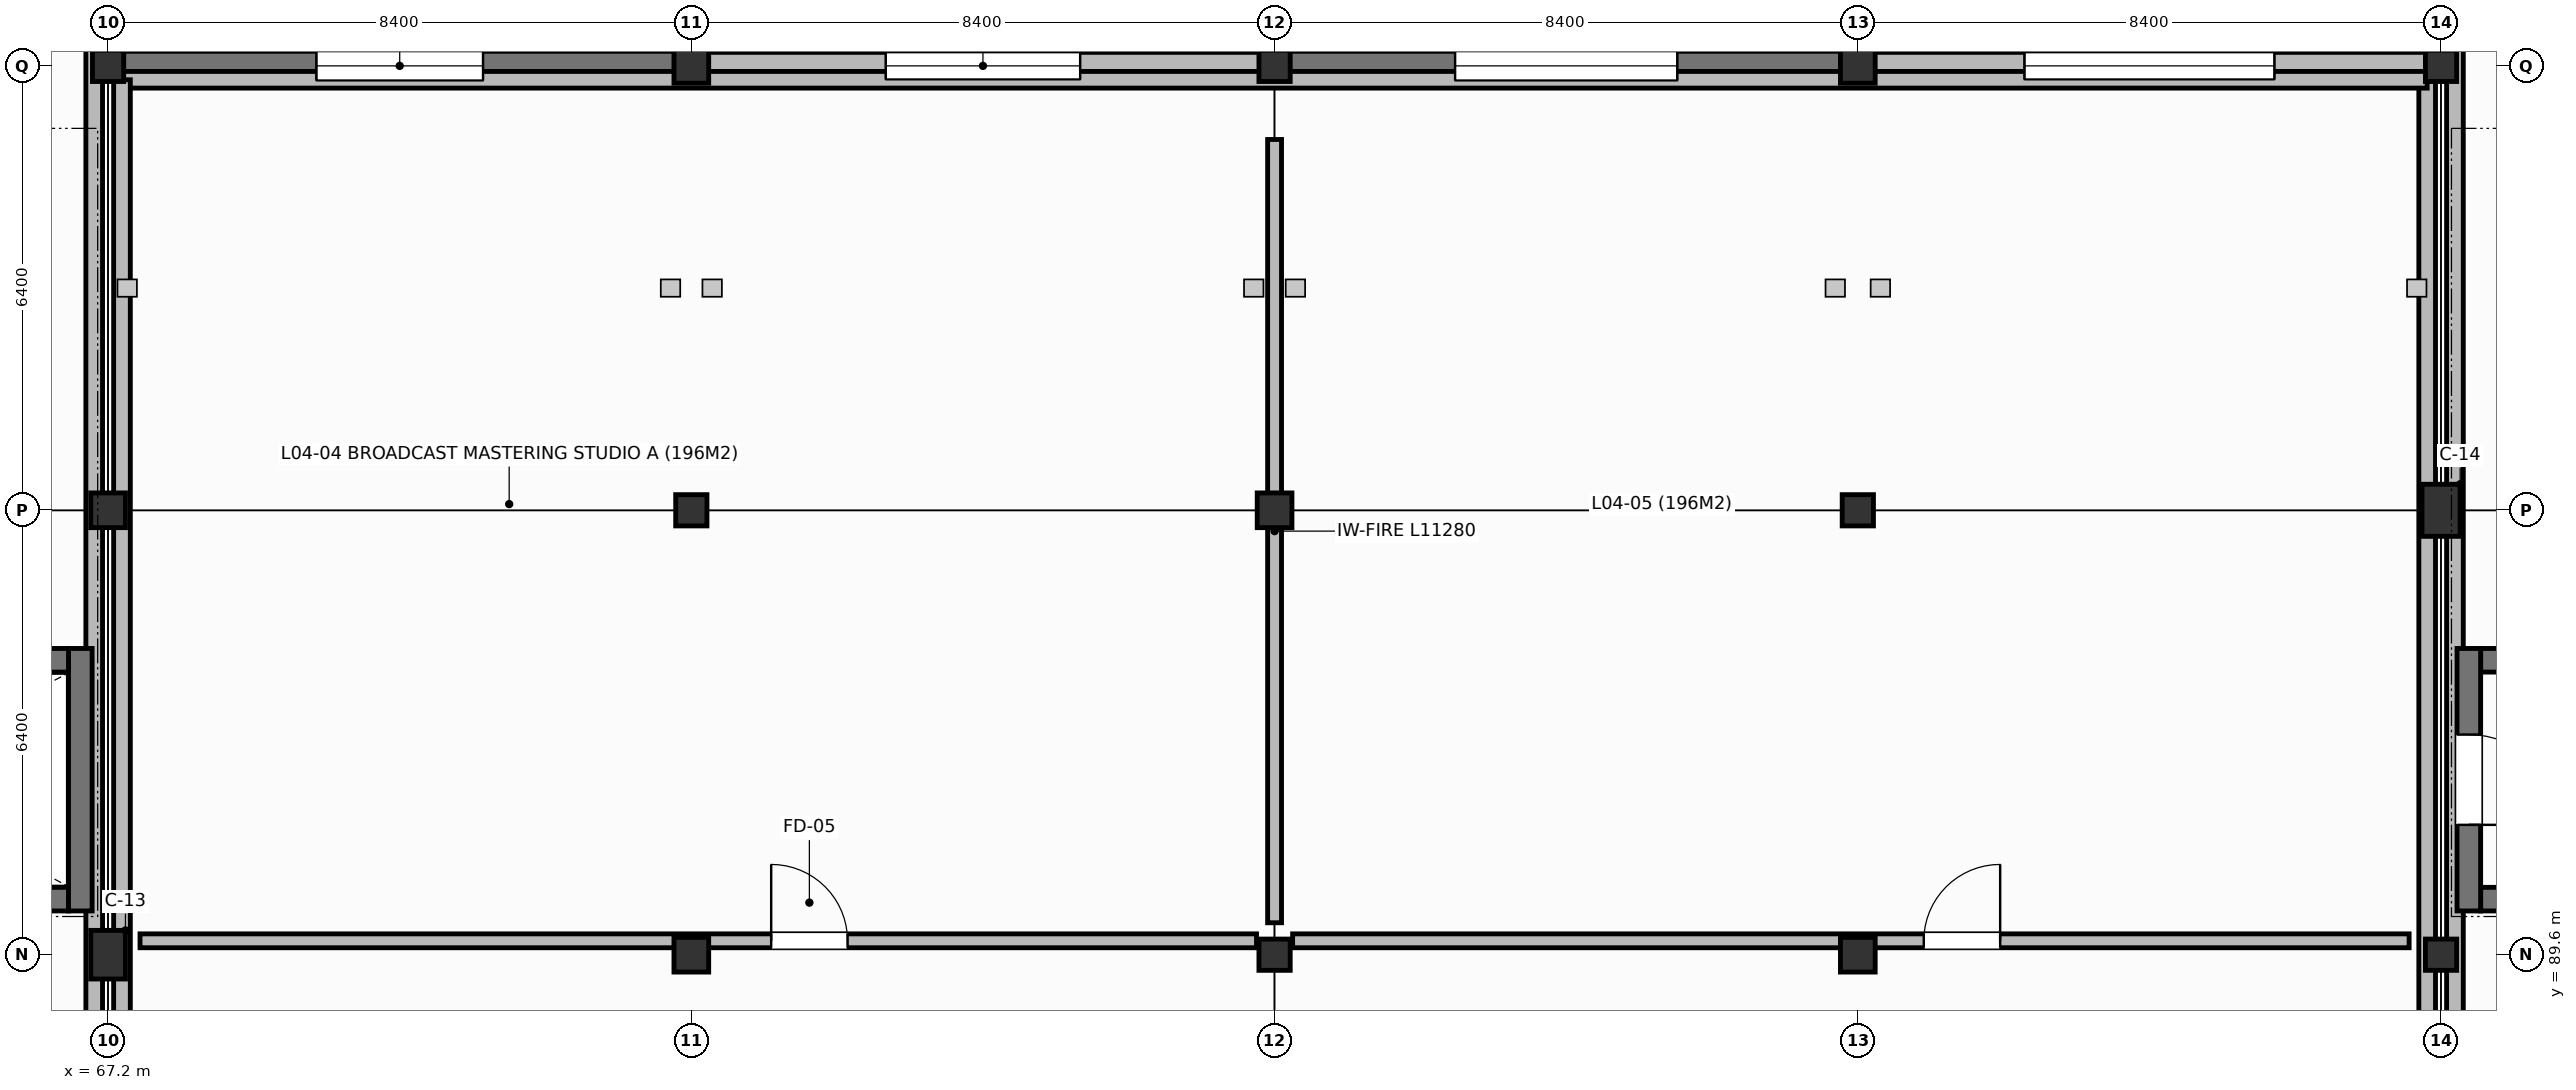
"""IFC4 building model, lengths in metres.
Left out: names, types, materials, properties, quantities, classifications, styles, units other than length and angle.
Written with IfcOpenShell. Run it as: python <this file> out.ifc"""

import sys

from ifc_helpers import new_model, si_unit, direction, frame, frame_2d, origin, origin_2d, place, context, subcontext, project, spatial, rectangle, extrude, element, fill, save


model = new_model("IFC4")
c1 = context("Model", 3, precision=1e-05, world=origin(), true_north=direction((0.0, 1.0)))
c2 = subcontext(c1, "Body", "Model", "MODEL_VIEW")
j1 = project(units=[si_unit("LENGTHUNIT", "METRE"), si_unit("PLANEANGLEUNIT", "RADIAN")], contexts=[c1])
p1 = place(None, origin())
s1 = spatial("IfcSite", under=j1, at=p1, CompositionType="ELEMENT")
p2 = place(p1, origin())
s2 = spatial("IfcBuilding", under=s1, at=p2, CompositionType="ELEMENT")
p3 = place(p2, frame((0.0, 0.0, 17.4)))
s3 = spatial("IfcBuildingStorey", under=s2, at=p3, CompositionType="ELEMENT", Elevation=17.4)
p4 = place(p3, frame((67.2, 89.6, 0.0), z_axis=(0.0, 0.0, 1.0), x_axis=(1.0, 0.0, 0.0)))
e1 = element("IfcColumn", 1, at=p4, inside=s3, PredefinedType="COLUMN", context=c2, shape_type="SweptSolid", body=[
    extrude(rectangle(XDim=0.5, YDim=0.7, at=origin_2d()), origin(), (0.0, 0.0, 1.0), 4.2),
])
p5 = place(p3, frame((67.2, 96.0, 0.0), z_axis=(0.0, 0.0, 1.0), x_axis=(1.0, 0.0, 0.0)))
e2 = element("IfcColumn", 2, at=p5, inside=s3, PredefinedType="COLUMN", context=c2, shape_type="SweptSolid", body=[
    extrude(rectangle(XDim=0.5, YDim=0.5, at=origin_2d()), origin(), (0.0, 0.0, 1.0), 4.2),
])
p6 = place(p3, frame((67.2, 102.4, 0.0), z_axis=(0.0, 0.0, 1.0), x_axis=(1.0, 0.0, 0.0)))
e3 = element("IfcColumn", 3, at=p6, inside=s3, PredefinedType="COLUMN", context=c2, shape_type="SweptSolid", body=[
    extrude(rectangle(XDim=0.45, YDim=0.45, at=origin_2d()), origin(), (0.0, 0.0, 1.0), 4.2),
])
p7 = place(p3, frame((75.6, 89.6, 0.0), z_axis=(0.0, 0.0, 1.0), x_axis=(1.0, 0.0, 0.0)))
e4 = element("IfcColumn", 4, at=p7, inside=s3, PredefinedType="COLUMN", context=c2, shape_type="SweptSolid", body=[
    extrude(rectangle(XDim=0.5, YDim=0.5, at=origin_2d()), origin(), (0.0, 0.0, 1.0), 4.2),
])
p8 = place(p3, frame((75.6, 96.0, 0.0), z_axis=(0.0, 0.0, 1.0), x_axis=(1.0, 0.0, 0.0)))
e5 = element("IfcColumn", 5, at=p8, inside=s3, PredefinedType="COLUMN", context=c2, shape_type="SweptSolid", body=[
    extrude(rectangle(XDim=0.45, YDim=0.45, at=origin_2d()), origin(), (0.0, 0.0, 1.0), 4.2),
])
p9 = place(p3, frame((75.6, 102.4, 0.0), z_axis=(0.0, 0.0, 1.0), x_axis=(1.0, 0.0, 0.0)))
e6 = element("IfcColumn", 6, at=p9, inside=s3, PredefinedType="COLUMN", context=c2, shape_type="SweptSolid", body=[
    extrude(rectangle(XDim=0.5, YDim=0.5, at=origin_2d()), origin(), (0.0, 0.0, 1.0), 4.2),
])
p10 = place(p3, frame((84.0, 89.6, 0.0), z_axis=(0.0, 0.0, 1.0), x_axis=(1.0, 0.0, 0.0)))
e7 = element("IfcColumn", 7, at=p10, inside=s3, PredefinedType="COLUMN", context=c2, shape_type="SweptSolid", body=[
    extrude(rectangle(XDim=0.45, YDim=0.45, at=origin_2d()), origin(), (0.0, 0.0, 1.0), 4.2),
])
p11 = place(p3, frame((84.0, 96.0, 0.0), z_axis=(0.0, 0.0, 1.0), x_axis=(1.0, 0.0, 0.0)))
e8 = element("IfcColumn", 8, at=p11, inside=s3, PredefinedType="COLUMN", context=c2, shape_type="SweptSolid", body=[
    extrude(rectangle(XDim=0.5, YDim=0.5, at=origin_2d()), origin(), (0.0, 0.0, 1.0), 4.2),
])
p12 = place(p3, frame((84.0, 102.4, 0.0), z_axis=(0.0, 0.0, 1.0), x_axis=(1.0, 0.0, 0.0)))
e9 = element("IfcColumn", 9, at=p12, inside=s3, PredefinedType="COLUMN", context=c2, shape_type="SweptSolid", body=[
    extrude(rectangle(XDim=0.45, YDim=0.45, at=origin_2d()), origin(), (0.0, 0.0, 1.0), 4.2),
])
p13 = place(p3, frame((92.4, 89.6, 0.0), z_axis=(0.0, 0.0, 1.0), x_axis=(1.0, 0.0, 0.0)))
e10 = element("IfcColumn", 10, at=p13, inside=s3, PredefinedType="COLUMN", context=c2, shape_type="SweptSolid", body=[
    extrude(rectangle(XDim=0.5, YDim=0.5, at=origin_2d()), origin(), (0.0, 0.0, 1.0), 4.2),
])
p14 = place(p3, frame((92.4, 96.0, 0.0), z_axis=(0.0, 0.0, 1.0), x_axis=(1.0, 0.0, 0.0)))
e11 = element("IfcColumn", 11, at=p14, inside=s3, PredefinedType="COLUMN", context=c2, shape_type="SweptSolid", body=[
    extrude(rectangle(XDim=0.45, YDim=0.45, at=origin_2d()), origin(), (0.0, 0.0, 1.0), 4.2),
])
p15 = place(p3, frame((92.4, 102.4, 0.0), z_axis=(0.0, 0.0, 1.0), x_axis=(1.0, 0.0, 0.0)))
e12 = element("IfcColumn", 12, at=p15, inside=s3, PredefinedType="COLUMN", context=c2, shape_type="SweptSolid", body=[
    extrude(rectangle(XDim=0.5, YDim=0.5, at=origin_2d()), origin(), (0.0, 0.0, 1.0), 4.2),
])
p16 = place(p3, frame((100.8, 89.6, 0.0), z_axis=(0.0, 0.0, 1.0), x_axis=(1.0, 0.0, 0.0)))
e13 = element("IfcColumn", 13, at=p16, inside=s3, PredefinedType="COLUMN", context=c2, shape_type="SweptSolid", body=[
    extrude(rectangle(XDim=0.45, YDim=0.45, at=origin_2d()), origin(), (0.0, 0.0, 1.0), 4.2),
])
p17 = place(p3, frame((100.8, 96.0, 0.0), z_axis=(0.0, 0.0, 1.0), x_axis=(1.0, 0.0, 0.0)))
e14 = element("IfcColumn", 14, at=p17, inside=s3, PredefinedType="COLUMN", context=c2, shape_type="SweptSolid", body=[
    extrude(rectangle(XDim=0.55, YDim=0.75, at=origin_2d()), origin(), (0.0, 0.0, 1.0), 4.2),
])
p18 = place(p3, frame((100.8, 102.4, 0.0), z_axis=(0.0, 0.0, 1.0), x_axis=(1.0, 0.0, 0.0)))
e15 = element("IfcColumn", 15, at=p18, inside=s3, PredefinedType="COLUMN", context=c2, shape_type="SweptSolid", body=[
    extrude(rectangle(XDim=0.45, YDim=0.45, at=origin_2d()), origin(), (0.0, 0.0, 1.0), 4.2),
])
p19 = place(p3, frame((67.2, 108.8, 0.0), z_axis=(0.0, 0.0, 1.0), x_axis=(0.0, -1.0, 0.0)))
e16 = element("IfcWall", 16, at=p19, inside=s3, PredefinedType="STANDARD", context=c2, shape_type="SweptSolid", body=[
    extrude(rectangle(XDim=6.4, YDim=0.39, at=frame_2d((3.2, 0.0))), origin(), (0.0, 0.0, 1.0), 2.89),
])
p20 = place(p19, frame((2.15, 0.0, 0.8)))
e17 = element("IfcOpeningElement", 17, at=p20, cuts=e16, PredefinedType="OPENING", context=c2, shape_type="SweptSolid", body=[
    extrude(rectangle(XDim=2.1, YDim=1.45, at=frame_2d((1.05, 0.725))), frame((0.0, 0.205, 0.0), z_axis=(0.0, -1.0, 0.0), x_axis=(1.0, 0.0, 0.0)), (0.0, 0.0, 1.0), 0.41),
])
p21 = place(p3, frame((67.2, 102.4, 0.0), z_axis=(0.0, 0.0, 1.0), x_axis=(1.0, 0.0, 0.0)))
e18 = element("IfcWall", 18, at=p21, inside=s3, PredefinedType="STANDARD", context=c2, shape_type="SweptSolid", body=[
    extrude(rectangle(XDim=8.4, YDim=0.42, at=frame_2d((4.2, 0.0))), origin(), (0.0, 0.0, 1.0), 3.84),
])
p22 = place(p21, frame((3.0, 0.0, 0.8)))
e19 = element("IfcOpeningElement", 19, at=p22, cuts=e18, PredefinedType="OPENING", context=c2, shape_type="SweptSolid", body=[
    extrude(rectangle(XDim=2.4, YDim=1.45, at=frame_2d((1.2, 0.725))), frame((0.0, 0.22, 0.0), z_axis=(0.0, -1.0, 0.0), x_axis=(1.0, 0.0, 0.0)), (0.0, 0.0, 1.0), 0.44),
])
p23 = place(p3, frame((75.6, 102.4, 0.0), z_axis=(0.0, 0.0, 1.0), x_axis=(1.0, 0.0, 0.0)))
e20 = element("IfcWall", 20, at=p23, inside=s3, PredefinedType="STANDARD", context=c2, shape_type="SweptSolid", body=[
    extrude(rectangle(XDim=8.4, YDim=0.39, at=frame_2d((4.2, 0.0))), origin(), (0.0, 0.0, 1.0), 3.19),
])
p24 = place(p23, frame((2.8, 0.0, 0.8)))
e21 = element("IfcOpeningElement", 21, at=p24, cuts=e20, PredefinedType="OPENING", context=c2, shape_type="SweptSolid", body=[
    extrude(rectangle(XDim=2.8, YDim=1.6, at=frame_2d((1.4, 0.8))), frame((0.0, 0.205, 0.0), z_axis=(0.0, -1.0, 0.0), x_axis=(1.0, 0.0, 0.0)), (0.0, 0.0, 1.0), 0.41),
])
p25 = place(p3, frame((84.0, 102.4, 0.0), z_axis=(0.0, 0.0, 1.0), x_axis=(1.0, 0.0, 0.0)))
e22 = element("IfcWall", 22, at=p25, inside=s3, PredefinedType="STANDARD", context=c2, shape_type="SweptSolid", body=[
    extrude(rectangle(XDim=8.4, YDim=0.42, at=frame_2d((4.2, 0.0))), origin(), (0.0, 0.0, 1.0), 3.84),
])
p26 = place(p25, frame((2.6, 0.0, 0.8)))
e23 = element("IfcOpeningElement", 23, at=p26, cuts=e22, PredefinedType="OPENING", context=c2, shape_type="SweptSolid", body=[
    extrude(rectangle(XDim=3.2, YDim=1.6, at=frame_2d((1.6, 0.8))), frame((0.0, 0.22, 0.0), z_axis=(0.0, -1.0, 0.0), x_axis=(1.0, 0.0, 0.0)), (0.0, 0.0, 1.0), 0.44),
])
p27 = place(p3, frame((92.4, 102.4, 0.0), z_axis=(0.0, 0.0, 1.0), x_axis=(1.0, 0.0, 0.0)))
e24 = element("IfcWall", 24, at=p27, inside=s3, PredefinedType="STANDARD", context=c2, shape_type="SweptSolid", body=[
    extrude(rectangle(XDim=8.4, YDim=0.39, at=frame_2d((4.2, 0.0))), origin(), (0.0, 0.0, 1.0), 3.09),
])
p28 = place(p27, frame((2.4, 0.0, 0.8)))
e25 = element("IfcOpeningElement", 25, at=p28, cuts=e24, PredefinedType="OPENING", context=c2, shape_type="SweptSolid", body=[
    extrude(rectangle(XDim=3.6, YDim=1.6, at=frame_2d((1.8, 0.8))), frame((0.0, 0.205, 0.0), z_axis=(0.0, -1.0, 0.0), x_axis=(1.0, 0.0, 0.0)), (0.0, 0.0, 1.0), 0.41),
])
p29 = place(p3, frame((100.8, 102.4, 0.0), z_axis=(0.0, 0.0, 1.0), x_axis=(0.0, 1.0, 0.0)))
e26 = element("IfcWall", 26, at=p29, inside=s3, PredefinedType="STANDARD", context=c2, shape_type="SweptSolid", body=[
    extrude(rectangle(XDim=6.4, YDim=0.42, at=frame_2d((3.2, 0.0))), origin(), (0.0, 0.0, 1.0), 3.84),
])
p30 = place(p29, frame((2.6, 0.0, 0.8)))
e27 = element("IfcOpeningElement", 27, at=p30, cuts=e26, PredefinedType="OPENING", context=c2, shape_type="SweptSolid", body=[
    extrude(rectangle(XDim=1.2, YDim=1.65, at=frame_2d((0.6, 0.825))), frame((0.0, 0.22, 0.0), z_axis=(0.0, -1.0, 0.0), x_axis=(1.0, 0.0, 0.0)), (0.0, 0.0, 1.0), 0.44),
])
p31 = place(p3, frame((67.0, 83.4, 4.2), z_axis=(0.0, 0.0, 1.0), x_axis=(0.0, 1.0, 0.0)))
e28 = element("IfcWall", 28, at=p31, inside=s3, PredefinedType="PARAPET", context=c2, shape_type="SweptSolid", body=[
    extrude(rectangle(XDim=31.6, YDim=0.24, at=frame_2d((15.8, 0.0))), origin(), (0.0, 0.0, 1.0), 1.15),
])
p32 = place(p3, frame((100.6, 83.4, 4.2), z_axis=(0.0, 0.0, 1.0), x_axis=(0.0, 1.0, 0.0)))
e29 = element("IfcWall", 29, at=p32, inside=s3, PredefinedType="PARAPET", context=c2, shape_type="SweptSolid", body=[
    extrude(rectangle(XDim=18.8, YDim=0.24, at=frame_2d((9.4, 0.0))), origin(), (0.0, 0.0, 1.0), 1.15),
])
p33 = place(p3, frame((100.6, 102.2, 4.2), z_axis=(0.0, 0.0, 1.0), x_axis=(-1.0, 0.0, 0.0)))
e30 = element("IfcWall", 30, at=p33, inside=s3, PredefinedType="PARAPET", context=c2, shape_type="SweptSolid", body=[
    extrude(rectangle(XDim=33.2, YDim=0.24, at=frame_2d((16.6, 0.0))), origin(), (0.0, 0.0, 1.0), 1.15),
])
p34 = place(p3, frame((67.4, 102.2, 4.2), z_axis=(0.0, 0.0, 1.0), x_axis=(0.0, -1.0, 0.0)))
e31 = element("IfcWall", 31, at=p34, inside=s3, PredefinedType="PARAPET", context=c2, shape_type="SweptSolid", body=[
    extrude(rectangle(XDim=18.8, YDim=0.24, at=frame_2d((9.4, 0.0))), origin(), (0.0, 0.0, 1.0), 1.15),
])
p35 = place(p3, frame((101.0, 115.0, 4.2), z_axis=(0.0, 0.0, 1.0), x_axis=(0.0, -1.0, 0.0)))
e32 = element("IfcWall", 32, at=p35, inside=s3, PredefinedType="PARAPET", context=c2, shape_type="SweptSolid", body=[
    extrude(rectangle(XDim=31.6, YDim=0.24, at=frame_2d((15.8, 0.0))), origin(), (0.0, 0.0, 1.0), 1.15),
])
p36 = place(p3, frame((59.37, 90.4, 0.0), z_axis=(0.0, 0.0, 1.0), x_axis=(1.0, 0.0, 0.0)))
e33 = element("IfcWall", 33, at=p36, inside=s3, PredefinedType="SHEAR", context=c2, shape_type="SweptSolid", body=[
    extrude(rectangle(XDim=7.26, YDim=0.34, at=frame_2d((3.63, 0.0))), origin(), (0.0, 0.0, 1.0), 4.2),
])
p37 = place(p3, frame((66.8, 90.23, 0.0), z_axis=(0.0, 0.0, 1.0), x_axis=(0.0, 1.0, 0.0)))
e34 = element("IfcWall", 34, at=p37, inside=s3, PredefinedType="SHEAR", context=c2, shape_type="SweptSolid", body=[
    extrude(rectangle(XDim=3.78, YDim=0.34, at=frame_2d((1.89, 0.0))), origin(), (0.0, 0.0, 1.0), 4.2),
])
for number, where, z_axis, x_axis in (
    (35, (66.63, 93.84, 0.0), (0.0, 0.0, 1.0), (-1.0, 0.0, 0.0)),
    (36, (101.37, 90.4, 0.0), (0.0, 0.0, 1.0), (1.0, 0.0, 0.0)),
    (37, (108.63, 93.84, 0.0), (0.0, 0.0, 1.0), (-1.0, 0.0, 0.0)),
):
    element("IfcWall", number, at=place(p3, frame(where, z_axis=z_axis, x_axis=x_axis)), inside=s3, PredefinedType="SHEAR", context=c2, shape_type="SweptSolid", body=[
        extrude(rectangle(XDim=7.26, YDim=0.34, at=frame_2d((3.63, 0.0))), origin(), (0.0, 0.0, 1.0), 4.2),
    ])
p38 = place(p3, frame((101.2, 94.01, 0.0), z_axis=(0.0, 0.0, 1.0), x_axis=(0.0, -1.0, 0.0)))
e38 = element("IfcWall", 38, at=p38, inside=s3, PredefinedType="SHEAR", context=c2, shape_type="SweptSolid", body=[
    extrude(rectangle(XDim=3.78, YDim=0.34, at=frame_2d((1.89, 0.0))), origin(), (0.0, 0.0, 1.0), 4.2),
])
p39 = place(p38, frame((1.24, 0.0, 0.0)))
e39 = element("IfcOpeningElement", 39, at=p39, cuts=e38, PredefinedType="OPENING", context=c2, shape_type="SweptSolid", body=[
    extrude(rectangle(XDim=1.3, YDim=2.15, at=frame_2d((0.65, 1.075))), frame((0.0, 0.18, 0.0), z_axis=(0.0, -1.0, 0.0), x_axis=(1.0, 0.0, 0.0)), (0.0, 0.0, 1.0), 0.36),
])
p40 = place(p3, frame((67.66, 89.8, 0.0), z_axis=(0.0, 0.0, 1.0), x_axis=(1.0, 0.0, 0.0)))
e40 = element("IfcWall", 40, at=p40, inside=s3, PredefinedType="PARTITIONING", context=c2, shape_type="SweptSolid", body=[
    extrude(rectangle(XDim=16.08, YDim=0.2, at=frame_2d((8.04, 0.0))), origin(), (0.0, 0.0, 1.0), 2.915),
])
p41 = place(p40, frame((9.09, 0.0, 0.0)))
e41 = element("IfcOpeningElement", 41, at=p41, cuts=e40, PredefinedType="OPENING", context=c2, shape_type="SweptSolid", body=[
    extrude(rectangle(XDim=1.1, YDim=2.15, at=frame_2d((0.55, 1.075))), frame((0.0, 0.11, 0.0), z_axis=(0.0, -1.0, 0.0), x_axis=(1.0, 0.0, 0.0)), (0.0, 0.0, 1.0), 0.22),
])
p42 = place(p3, frame((84.0, 90.06, 0.0), z_axis=(0.0, 0.0, 1.0), x_axis=(0.0, 1.0, 0.0)))
e42 = element("IfcWall", 42, at=p42, inside=s3, PredefinedType="PARTITIONING", context=c2, shape_type="SweptSolid", body=[
    extrude(rectangle(XDim=11.28, YDim=0.2, at=frame_2d((5.64, 0.0))), origin(), (0.0, 0.0, 1.0), 2.765),
])
p43 = place(p3, frame((84.26, 89.8, 0.0), z_axis=(0.0, 0.0, 1.0), x_axis=(1.0, 0.0, 0.0)))
e43 = element("IfcWall", 43, at=p43, inside=s3, PredefinedType="PARTITIONING", context=c2, shape_type="SweptSolid", body=[
    extrude(rectangle(XDim=16.08, YDim=0.2, at=frame_2d((8.04, 0.0))), origin(), (0.0, 0.0, 1.0), 3.165),
])
p44 = place(p43, frame((9.09, 0.0, 0.0)))
e44 = element("IfcOpeningElement", 44, at=p44, cuts=e43, PredefinedType="OPENING", context=c2, shape_type="SweptSolid", body=[
    extrude(rectangle(XDim=1.1, YDim=2.15, at=frame_2d((0.55, 1.075))), frame((0.0, 0.11, 0.0), z_axis=(0.0, -1.0, 0.0), x_axis=(1.0, 0.0, 0.0)), (0.0, 0.0, 1.0), 0.22),
])
p45 = place(p22, origin())
e45 = element("IfcWindow", 45, at=p45, inside=s3, PartitioningType="TRIPLE_PANEL_VERTICAL", PredefinedType="WINDOW", context=c2, shape_type="SweptSolid", body=[
    extrude(rectangle(XDim=2.4, YDim=1.45, at=frame_2d((1.2, 0.725))), frame((0.0, 0.03, 0.0), z_axis=(0.0, -1.0, 0.0), x_axis=(1.0, 0.0, 0.0)), (0.0, 0.0, 1.0), 0.06),
])
fill(e19, e45)
p46 = place(p24, origin())
e46 = element("IfcWindow", 46, at=p46, inside=s3, PartitioningType="TRIPLE_PANEL_VERTICAL", PredefinedType="WINDOW", context=c2, shape_type="SweptSolid", body=[
    extrude(rectangle(XDim=2.8, YDim=1.6, at=frame_2d((1.4, 0.8))), frame((0.0, 0.03, 0.0), z_axis=(0.0, -1.0, 0.0), x_axis=(1.0, 0.0, 0.0)), (0.0, 0.0, 1.0), 0.06),
])
fill(e21, e46)
p47 = place(p26, origin())
e47 = element("IfcWindow", 47, at=p47, inside=s3, PartitioningType="TRIPLE_PANEL_VERTICAL", PredefinedType="WINDOW", context=c2, shape_type="SweptSolid", body=[
    extrude(rectangle(XDim=3.2, YDim=1.6, at=frame_2d((1.6, 0.8))), frame((0.0, 0.03, 0.0), z_axis=(0.0, -1.0, 0.0), x_axis=(1.0, 0.0, 0.0)), (0.0, 0.0, 1.0), 0.06),
])
fill(e23, e47)
p48 = place(p28, origin())
e48 = element("IfcWindow", 48, at=p48, inside=s3, PartitioningType="TRIPLE_PANEL_VERTICAL", PredefinedType="WINDOW", context=c2, shape_type="SweptSolid", body=[
    extrude(rectangle(XDim=3.6, YDim=1.6, at=frame_2d((1.8, 0.8))), frame((0.0, 0.03, 0.0), z_axis=(0.0, -1.0, 0.0), x_axis=(1.0, 0.0, 0.0)), (0.0, 0.0, 1.0), 0.06),
])
fill(e25, e48)
p49 = place(p39, origin())
e49 = element("IfcDoor", 49, at=p49, inside=s3, OperationType="SINGLE_SWING_RIGHT", PredefinedType="DOOR", context=c2, shape_type="SweptSolid", body=[
    extrude(rectangle(XDim=1.3, YDim=2.15, at=frame_2d((0.65, 1.075))), frame((0.0, 0.025, 0.0), z_axis=(0.0, -1.0, 0.0), x_axis=(1.0, 0.0, 0.0)), (0.0, 0.0, 1.0), 0.05),
])
fill(e39, e49)
p50 = place(p41, origin())
e50 = element("IfcDoor", 50, at=p50, inside=s3, OperationType="SINGLE_SWING_LEFT", PredefinedType="DOOR", context=c2, shape_type="SweptSolid", body=[
    extrude(rectangle(XDim=1.1, YDim=2.15, at=frame_2d((0.55, 1.075))), frame((0.0, 0.025, 0.0), z_axis=(0.0, -1.0, 0.0), x_axis=(1.0, 0.0, 0.0)), (0.0, 0.0, 1.0), 0.05),
])
fill(e41, e50)
p51 = place(p44, origin())
e51 = element("IfcDoor", 51, at=p51, inside=s3, OperationType="SINGLE_SWING_RIGHT", PredefinedType="DOOR", context=c2, shape_type="SweptSolid", body=[
    extrude(rectangle(XDim=1.1, YDim=2.15, at=frame_2d((0.55, 1.075))), frame((0.0, 0.025, 0.0), z_axis=(0.0, -1.0, 0.0), x_axis=(1.0, 0.0, 0.0)), (0.0, 0.0, 1.0), 0.05),
])
fill(e44, e51)
save(model, sys.argv[1])
